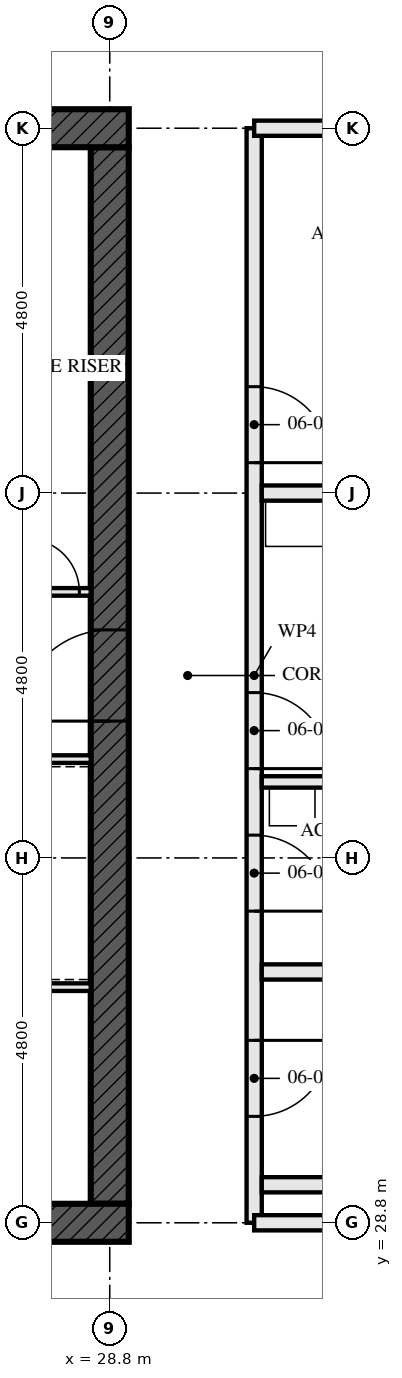
"""IFC4 building model, lengths in metres.
Left out: names, types, materials, properties, quantities, classifications, styles, units other than length and angle.
Written with IfcOpenShell. Run it as: python <this file> out.ifc"""

import sys

from ifc_helpers import new_model, si_unit, direction, frame, frame_2d, origin, place, context, subcontext, project, spatial, rectangle, extrude, element, fill, save


model = new_model("IFC4")
c1 = context("Model", 3, precision=1e-05, world=origin(), true_north=direction((0.0, 1.0)))
c2 = subcontext(c1, "Body", "Model", "MODEL_VIEW")
j1 = project(units=[si_unit("LENGTHUNIT", "METRE"), si_unit("PLANEANGLEUNIT", "RADIAN")], contexts=[c1])
p1 = place(None, origin())
s1 = spatial("IfcSite", under=j1, at=p1, CompositionType="ELEMENT")
p2 = place(p1, origin())
s2 = spatial("IfcBuilding", under=s1, at=p2, CompositionType="ELEMENT")
p3 = place(p2, frame((0.0, 0.0, 27.0)))
s3 = spatial("IfcBuildingStorey", under=s2, at=p3, CompositionType="ELEMENT", Elevation=27.0)
p4 = place(p3, frame((14.15, 28.8, -0.17), z_axis=(0.0, 0.0, 1.0), x_axis=(1.0, 0.0, 0.0)))
e1 = element("IfcWall", 1, at=p4, inside=s3, PredefinedType="SHEAR", context=c2, shape_type="SweptSolid", body=[
    extrude(rectangle(XDim=14.9, YDim=0.5, at=frame_2d((7.45, 0.0))), origin(), (0.0, 0.0, 1.0), 3.5),
])
p5 = place(p4, frame((6.85, 0.0, 0.17)))
e2 = element("IfcOpeningElement", 2, at=p5, cuts=e1, PredefinedType="OPENING", context=c2, shape_type="SweptSolid", body=[
    extrude(rectangle(XDim=1.2, YDim=2.1, at=frame_2d((0.6, 1.05))), frame((0.0, 0.26, 0.0), z_axis=(0.0, -1.0, 0.0), x_axis=(1.0, 0.0, 0.0)), (0.0, 0.0, 1.0), 0.521),
])
p6 = place(p3, frame((29.05, 43.2, -0.17), z_axis=(0.0, 0.0, 1.0), x_axis=(-1.0, 0.0, 0.0)))
e3 = element("IfcWall", 3, at=p6, inside=s3, PredefinedType="SHEAR", context=c2, shape_type="SweptSolid", body=[
    extrude(rectangle(XDim=14.9, YDim=0.5, at=frame_2d((7.45, 0.0))), origin(), (0.0, 0.0, 1.0), 3.5),
])
p7 = place(p6, frame((6.85, 0.0, 0.17)))
e4 = element("IfcOpeningElement", 4, at=p7, cuts=e3, PredefinedType="OPENING", context=c2, shape_type="SweptSolid", body=[
    extrude(rectangle(XDim=1.2, YDim=2.1, at=frame_2d((0.6, 1.05))), frame((0.0, 0.26, 0.0), z_axis=(0.0, -1.0, 0.0), x_axis=(1.0, 0.0, 0.0)), (0.0, 0.0, 1.0), 0.521),
])
p8 = place(p3, frame((28.8, 29.05, -0.17), z_axis=(0.0, 0.0, 1.0), x_axis=(0.0, 1.0, 0.0)))
e5 = element("IfcWall", 5, at=p8, inside=s3, PredefinedType="SHEAR", context=c2, shape_type="SweptSolid", body=[
    extrude(rectangle(XDim=13.9, YDim=0.5, at=frame_2d((6.95, 0.0))), origin(), (0.0, 0.0, 1.0), 3.5),
])
p9 = place(p8, frame((6.35, 0.0, 0.17)))
e6 = element("IfcOpeningElement", 6, at=p9, cuts=e5, PredefinedType="OPENING", context=c2, shape_type="SweptSolid", body=[
    extrude(rectangle(XDim=1.2, YDim=2.1, at=frame_2d((0.6, 1.05))), frame((0.0, 0.26, 0.0), z_axis=(0.0, -1.0, 0.0), x_axis=(1.0, 0.0, 0.0)), (0.0, 0.0, 1.0), 0.521),
])
for number, where, z_axis, x_axis in (
    (7, (35.5, 29.3, 0.0), (0.0, 0.0, 1.0), (-1.0, 0.0, 0.0)),
    (8, (35.5, 32.1, 0.0), (0.0, 0.0, 1.0), (-1.0, 0.0, 0.0)),
):
    element("IfcWall", number, at=place(p3, frame(where, z_axis=z_axis, x_axis=x_axis)), inside=s3, PredefinedType="SOLIDWALL", context=c2, shape_type="SweptSolid", body=[
        extrude(rectangle(XDim=4.7, YDim=0.2, at=frame_2d((2.35, 0.0))), origin(), (0.0, 0.0, 1.0), 2.99),
    ])
p10 = place(p3, frame((33.8, 34.6, 0.0), z_axis=(0.0, 0.0, 1.0), x_axis=(-1.0, 0.0, 0.0)))
e9 = element("IfcWall", 9, at=p10, inside=s3, PredefinedType="PARTITIONING", context=c2, shape_type="SweptSolid", body=[
    extrude(rectangle(XDim=3.0, YDim=0.15, at=frame_2d((1.5, 0.0))), origin(), (0.0, 0.0, 1.0), 3.33),
])
p11 = place(p3, frame((42.805, 38.4, 0.0), z_axis=(0.0, 0.0, 1.0), x_axis=(-1.0, 0.0, 0.0)))
e10 = element("IfcWall", 10, at=p11, inside=s3, PredefinedType="PARTITIONING", context=c2, shape_type="SweptSolid", body=[
    extrude(rectangle(XDim=12.005, YDim=0.2, at=frame_2d((6.002, 0.0))), origin(), (0.0, 0.0, 1.0), 2.55),
])
p12 = place(p3, frame((30.7, 28.8, 0.0), z_axis=(0.0, 0.0, 1.0), x_axis=(0.0, 1.0, 0.0)))
e11 = element("IfcWall", 11, at=p12, inside=s3, PredefinedType="PARTITIONING", context=c2, shape_type="SweptSolid", body=[
    extrude(rectangle(XDim=14.4, YDim=0.2, at=frame_2d((7.2, 0.0))), origin(), (0.0, 0.0, 1.0), 2.55),
])
p13 = place(p12, frame((1.4, 0.0, 0.0)))
e12 = element("IfcOpeningElement", 12, at=p13, cuts=e11, PredefinedType="OPENING", context=c2, shape_type="SweptSolid", body=[
    extrude(rectangle(XDim=1.0, YDim=2.1, at=frame_2d((0.5, 1.05))), frame((0.0, 0.111, 0.0), z_axis=(0.0, -1.0, 0.0), x_axis=(1.0, 0.0, 0.0)), (0.0, 0.0, 1.0), 0.221),
])
p14 = place(p12, frame((4.1, 0.0, 0.0)))
e13 = element("IfcOpeningElement", 13, at=p14, cuts=e11, PredefinedType="OPENING", context=c2, shape_type="SweptSolid", body=[
    extrude(rectangle(XDim=1.0, YDim=2.1, at=frame_2d((0.5, 1.05))), frame((0.0, 0.111, 0.0), z_axis=(0.0, -1.0, 0.0), x_axis=(1.0, 0.0, 0.0)), (0.0, 0.0, 1.0), 0.221),
])
p15 = place(p12, frame((5.975, 0.0, 0.0)))
e14 = element("IfcOpeningElement", 14, at=p15, cuts=e11, PredefinedType="OPENING", context=c2, shape_type="SweptSolid", body=[
    extrude(rectangle(XDim=1.0, YDim=2.1, at=frame_2d((0.5, 1.05))), frame((0.0, 0.111, 0.0), z_axis=(0.0, -1.0, 0.0), x_axis=(1.0, 0.0, 0.0)), (0.0, 0.0, 1.0), 0.221),
])
p16 = place(p12, frame((10.0, 0.0, 0.0)))
e15 = element("IfcOpeningElement", 15, at=p16, cuts=e11, PredefinedType="OPENING", context=c2, shape_type="SweptSolid", body=[
    extrude(rectangle(XDim=1.0, YDim=2.1, at=frame_2d((0.5, 1.05))), frame((0.0, 0.111, 0.0), z_axis=(0.0, -1.0, 0.0), x_axis=(1.0, 0.0, 0.0)), (0.0, 0.0, 1.0), 0.221),
])
p17 = place(p3, frame((23.05, 34.9, 0.0), z_axis=(0.0, 0.0, 1.0), x_axis=(1.0, 0.0, 0.0)))
e16 = element("IfcWall", 16, at=p17, inside=s3, PredefinedType="SOLIDWALL", context=c2, shape_type="SweptSolid", body=[
    extrude(rectangle(XDim=5.5, YDim=0.1, at=frame_2d((2.75, 0.0))), origin(), (0.0, 0.0, 1.0), 3.33),
])
p18 = place(p3, frame((22.65, 37.1, 0.0), z_axis=(0.0, 0.0, 1.0), x_axis=(1.0, 0.0, 0.0)))
e17 = element("IfcWall", 17, at=p18, inside=s3, PredefinedType="SOLIDWALL", context=c2, shape_type="SweptSolid", body=[
    extrude(rectangle(XDim=5.9, YDim=0.1, at=frame_2d((2.95, 0.0))), origin(), (0.0, 0.0, 1.0), 3.33),
])
p19 = place(p18, frame((3.45, 0.0, 0.0)))
e18 = element("IfcOpeningElement", 18, at=p19, cuts=e17, PredefinedType="OPENING", context=c2, shape_type="SweptSolid", body=[
    extrude(rectangle(XDim=1.0, YDim=2.1, at=frame_2d((0.5, 1.05))), frame((0.0, 0.061, 0.0), z_axis=(0.0, -1.0, 0.0), x_axis=(1.0, 0.0, 0.0)), (0.0, 0.0, 1.0), 0.121),
])
p20 = place(p18, frame((5.05, 0.0, 0.0)))
e19 = element("IfcOpeningElement", 19, at=p20, cuts=e17, PredefinedType="OPENING", context=c2, shape_type="SweptSolid", body=[
    extrude(rectangle(XDim=0.7, YDim=2.1, at=frame_2d((0.35, 1.05))), frame((0.0, 0.061, 0.0), z_axis=(0.0, -1.0, 0.0), x_axis=(1.0, 0.0, 0.0)), (0.0, 0.0, 1.0), 0.121),
])
p21 = place(p3, frame((23.15, 31.9, 0.0), z_axis=(0.0, 0.0, 1.0), x_axis=(1.0, 0.0, 0.0)))
e20 = element("IfcWall", 20, at=p21, inside=s3, PredefinedType="SOLIDWALL", context=c2, shape_type="SweptSolid", body=[
    extrude(rectangle(XDim=5.4, YDim=0.1, at=frame_2d((2.7, 0.0))), origin(), (0.0, 0.0, 1.0), 3.33),
])
for number, where, z_axis, x_axis in (
    (21, (33.205, 28.8, 0.0), (0.0, 0.0, 1.0), (-1.0, 0.0, 0.0)),
    (22, (33.205, 43.2, 0.0), (0.0, 0.0, 1.0), (-1.0, 0.0, 0.0)),
):
    element("IfcWall", number, at=place(p3, frame(where, z_axis=z_axis, x_axis=x_axis)), inside=s3, PredefinedType="PARTITIONING", context=c2, shape_type="SweptSolid", body=[
        extrude(rectangle(XDim=2.505, YDim=0.2, at=frame_2d((1.252, 0.0))), origin(), (0.0, 0.0, 1.0), 2.32),
    ])
p22 = place(p13, frame((1.0, 0.0, 0.0), z_axis=(0.0, 0.0, 1.0), x_axis=(-1.0, 0.0, 0.0)))
e23 = element("IfcDoor", 23, at=p22, inside=s3, OperationType="SINGLE_SWING_RIGHT", PredefinedType="DOOR", context=c2, shape_type="SweptSolid", body=[
    extrude(rectangle(XDim=1.0, YDim=2.1, at=frame_2d((0.5, 1.05))), frame((0.0, 0.032, 0.0), z_axis=(0.0, -1.0, 0.0), x_axis=(1.0, 0.0, 0.0)), (0.0, 0.0, 1.0), 0.064),
])
fill(e12, e23)
p23 = place(p14, frame((1.0, 0.0, 0.0), z_axis=(0.0, 0.0, 1.0), x_axis=(-1.0, 0.0, 0.0)))
e24 = element("IfcDoor", 24, at=p23, inside=s3, OperationType="SINGLE_SWING_LEFT", PredefinedType="DOOR", context=c2, shape_type="SweptSolid", body=[
    extrude(rectangle(XDim=1.0, YDim=2.1, at=frame_2d((0.5, 1.05))), frame((0.0, 0.027, 0.0), z_axis=(0.0, -1.0, 0.0), x_axis=(1.0, 0.0, 0.0)), (0.0, 0.0, 1.0), 0.054),
])
fill(e13, e24)
p24 = place(p15, frame((1.0, 0.0, 0.0), z_axis=(0.0, 0.0, 1.0), x_axis=(-1.0, 0.0, 0.0)))
e25 = element("IfcDoor", 25, at=p24, inside=s3, OperationType="SINGLE_SWING_LEFT", PredefinedType="DOOR", context=c2, shape_type="SweptSolid", body=[
    extrude(rectangle(XDim=1.0, YDim=2.1, at=frame_2d((0.5, 1.05))), frame((0.0, 0.027, 0.0), z_axis=(0.0, -1.0, 0.0), x_axis=(1.0, 0.0, 0.0)), (0.0, 0.0, 1.0), 0.054),
])
fill(e14, e25)
p25 = place(p16, frame((1.0, 0.0, 0.0), z_axis=(0.0, 0.0, 1.0), x_axis=(-1.0, 0.0, 0.0)))
e26 = element("IfcDoor", 26, at=p25, inside=s3, OperationType="SINGLE_SWING_LEFT", PredefinedType="DOOR", context=c2, shape_type="SweptSolid", body=[
    extrude(rectangle(XDim=1.0, YDim=2.1, at=frame_2d((0.5, 1.05))), frame((0.0, 0.027, 0.0), z_axis=(0.0, -1.0, 0.0), x_axis=(1.0, 0.0, 0.0)), (0.0, 0.0, 1.0), 0.054),
])
fill(e15, e26)
p26 = place(p20, origin())
e27 = element("IfcDoor", 27, at=p26, inside=s3, OperationType="SINGLE_SWING_RIGHT", PredefinedType="DOOR", context=c2, shape_type="SweptSolid", body=[
    extrude(rectangle(XDim=0.7, YDim=2.1, at=frame_2d((0.35, 1.05))), frame((0.0, 0.027, 0.0), z_axis=(0.0, -1.0, 0.0), x_axis=(1.0, 0.0, 0.0)), (0.0, 0.0, 1.0), 0.054),
])
fill(e19, e27)
p27 = place(p9, origin())
e28 = element("IfcDoor", 28, at=p27, inside=s3, OperationType="SINGLE_SWING_LEFT", PredefinedType="DOOR", context=c2, shape_type="SweptSolid", body=[
    extrude(rectangle(XDim=1.2, YDim=2.1, at=frame_2d((0.6, 1.05))), frame((0.0, 0.027, 0.0), z_axis=(0.0, -1.0, 0.0), x_axis=(1.0, 0.0, 0.0)), (0.0, 0.0, 1.0), 0.054),
])
fill(e6, e28)
save(model, sys.argv[1])
